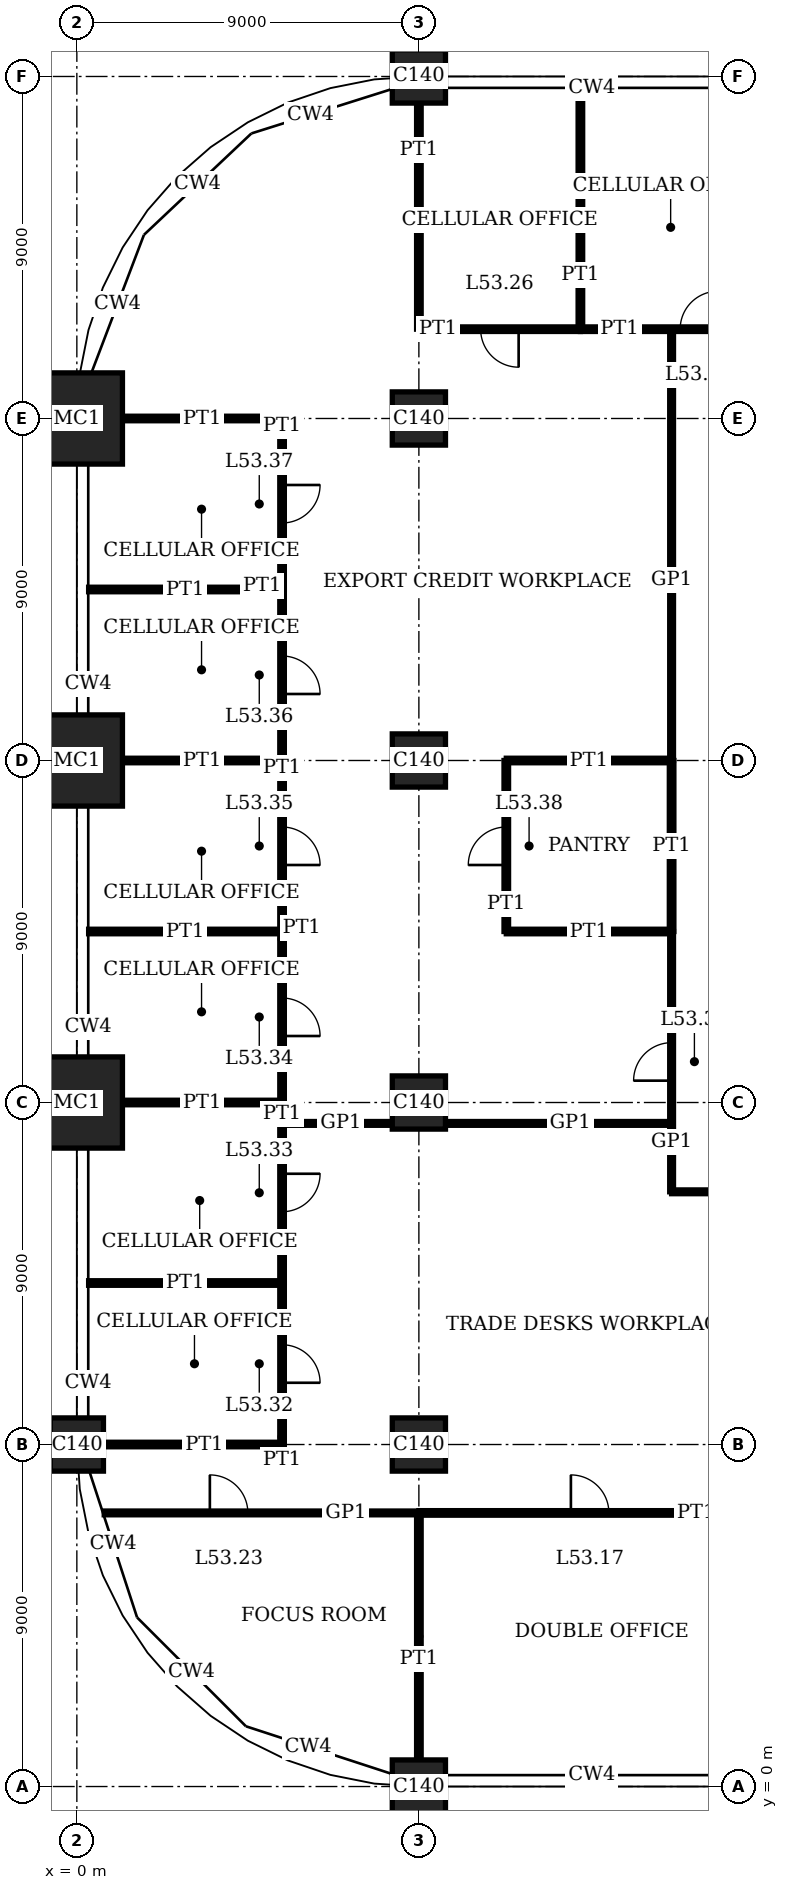
"""IFC4 building model, lengths in metres.
Left out: names, types, materials, properties, quantities, classifications, styles, units other than length and angle.
Written with IfcOpenShell. Run it as: python <this file> out.ifc"""

import sys

from ifc_helpers import new_model, si_unit, direction, frame, frame_2d, origin, origin_2d, place, context, subcontext, project, spatial, rectangle, extrude, element, fill, save


model = new_model("IFC4")
c1 = context("Model", 3, precision=1e-05, world=origin(), true_north=direction((0.0, 1.0)))
c2 = subcontext(c1, "Body", "Model", "MODEL_VIEW")
j1 = project(units=[si_unit("LENGTHUNIT", "METRE"), si_unit("PLANEANGLEUNIT", "RADIAN")], contexts=[c1])
p1 = place(None, origin())
s1 = spatial("IfcSite", under=j1, at=p1, CompositionType="ELEMENT")
p2 = place(p1, origin())
s2 = spatial("IfcBuilding", under=s1, at=p2, CompositionType="ELEMENT")
p3 = place(p2, frame((0.0, 0.0, 218.2)))
s3 = spatial("IfcBuildingStorey", under=s2, at=p3, CompositionType="ELEMENT", Elevation=218.2)
p4 = place(p3, frame((0.0, 9.0, 0.0), z_axis=(0.0, 0.0, 1.0), x_axis=(1.0, 0.0, 0.0)))
e1 = element("IfcColumn", 1, at=p4, inside=s3, PredefinedType="COLUMN", context=c2, shape_type="SweptSolid", body=[
    extrude(rectangle(XDim=1.4, YDim=1.4, at=origin_2d()), origin(), (0.0, 0.0, 1.0), 4.0),
])
for number, where, z_axis, x_axis in (
    (2, (0.0, 18.0, 0.0), (0.0, 0.0, 1.0), (1.0, 0.0, 0.0)),
    (3, (0.0, 27.0, 0.0), (0.0, 0.0, 1.0), (1.0, 0.0, 0.0)),
    (4, (0.0, 36.0, 0.0), (0.0, 0.0, 1.0), (1.0, 0.0, 0.0)),
):
    element("IfcColumn", number, at=place(p3, frame(where, z_axis=z_axis, x_axis=x_axis)), inside=s3, PredefinedType="COLUMN", context=c2, shape_type="SweptSolid", body=[
        extrude(rectangle(XDim=2.4, YDim=2.4, at=origin_2d()), origin(), (0.0, 0.0, 1.0), 4.0),
    ])
for number, where, z_axis, x_axis in (
    (5, (9.0, 0.0, 0.0), (0.0, 0.0, 1.0), (1.0, 0.0, 0.0)),
    (6, (9.0, 9.0, 0.0), (0.0, 0.0, 1.0), (1.0, 0.0, 0.0)),
    (7, (9.0, 18.0, 0.0), (0.0, 0.0, 1.0), (1.0, 0.0, 0.0)),
    (8, (9.0, 27.0, 0.0), (0.0, 0.0, 1.0), (1.0, 0.0, 0.0)),
    (9, (9.0, 36.0, 0.0), (0.0, 0.0, 1.0), (1.0, 0.0, 0.0)),
    (10, (9.0, 45.0, 0.0), (0.0, 0.0, 1.0), (1.0, 0.0, 0.0)),
):
    element("IfcColumn", number, at=place(p3, frame(where, z_axis=z_axis, x_axis=x_axis)), inside=s3, PredefinedType="COLUMN", context=c2, shape_type="SweptSolid", body=[
        extrude(rectangle(XDim=1.4, YDim=1.4, at=origin_2d()), origin(), (0.0, 0.0, 1.0), 4.0),
    ])
p5 = place(p3, frame((9.0, 7.2, 0.0), z_axis=(0.0, 0.0, 1.0), x_axis=(1.0, 0.0, 0.0)))
e11 = element("IfcWall", 11, at=p5, inside=s3, PredefinedType="PARTITIONING", context=c2, shape_type="SweptSolid", body=[
    extrude(rectangle(XDim=9.0, YDim=0.12, at=frame_2d((4.5, 0.0))), origin(), (0.0, 0.0, 1.0), 3.75),
])
p6 = place(p5, frame((4.0, 0.0, 0.0)))
e12 = element("IfcOpeningElement", 12, at=p6, cuts=e11, PredefinedType="OPENING", context=c2, shape_type="SweptSolid", body=[
    extrude(rectangle(XDim=1.0, YDim=2.4, at=frame_2d((0.5, 1.2))), frame((0.0, 0.07, 0.0), z_axis=(0.0, -1.0, 0.0), x_axis=(1.0, 0.0, 0.0)), (0.0, 0.0, 1.0), 0.14),
])
p7 = place(p3, frame((0.72, 7.2, 0.0), z_axis=(0.0, 0.0, 1.0), x_axis=(1.0, 0.0, 0.0)))
e13 = element("IfcWall", 13, at=p7, inside=s3, PredefinedType="PARTITIONING", context=c2, shape_type="SweptSolid", body=[
    extrude(rectangle(XDim=8.28, YDim=0.1, at=frame_2d((4.14, 0.0))), origin(), (0.0, 0.0, 1.0), 3.75),
])
p8 = place(p7, frame((2.78, 0.0, 0.0)))
e14 = element("IfcOpeningElement", 14, at=p8, cuts=e13, PredefinedType="OPENING", context=c2, shape_type="SweptSolid", body=[
    extrude(rectangle(XDim=1.0, YDim=2.4, at=frame_2d((0.5, 1.2))), frame((0.0, 0.06, 0.0), z_axis=(0.0, -1.0, 0.0), x_axis=(1.0, 0.0, 0.0)), (0.0, 0.0, 1.0), 0.12),
])
p9 = place(p3, frame((0.7, 9.0, 0.0), z_axis=(0.0, 0.0, 1.0), x_axis=(1.0, 0.0, 0.0)))
e15 = element("IfcWall", 15, at=p9, inside=s3, PredefinedType="PARTITIONING", context=c2, shape_type="SweptSolid", body=[
    extrude(rectangle(XDim=4.7, YDim=0.12, at=frame_2d((2.35, 0.0))), origin(), (0.0, 0.0, 1.0), 3.05),
])
p10 = place(p3, frame((0.31, 13.25, 0.0), z_axis=(0.0, 0.0, 1.0), x_axis=(1.0, 0.0, 0.0)))
e16 = element("IfcWall", 16, at=p10, inside=s3, PredefinedType="PARTITIONING", context=c2, shape_type="SweptSolid", body=[
    extrude(rectangle(XDim=5.09, YDim=0.12, at=frame_2d((2.545, 0.0))), origin(), (0.0, 0.0, 1.0), 3.1),
])
p11 = place(p3, frame((15.65, 15.65, 0.0), z_axis=(0.0, 0.0, 1.0), x_axis=(1.0, 0.0, 0.0)))
e17 = element("IfcWall", 17, at=p11, inside=s3, PredefinedType="PARTITIONING", context=c2, shape_type="SweptSolid", body=[
    extrude(rectangle(XDim=15.85, YDim=0.1, at=frame_2d((7.925, 0.0))), origin(), (0.0, 0.0, 1.0), 3.75),
])
p12 = place(p11, frame((7.425, 0.0, 0.0)))
e18 = element("IfcOpeningElement", 18, at=p12, cuts=e17, PredefinedType="OPENING", context=c2, shape_type="SweptSolid", body=[
    extrude(rectangle(XDim=1.0, YDim=2.4, at=frame_2d((0.5, 1.2))), frame((0.0, 0.06, 0.0), z_axis=(0.0, -1.0, 0.0), x_axis=(1.0, 0.0, 0.0)), (0.0, 0.0, 1.0), 0.12),
])
p13 = place(p3, frame((5.39, 17.45, 0.0), z_axis=(0.0, 0.0, 1.0), x_axis=(1.0, 0.0, 0.0)))
e19 = element("IfcWall", 19, at=p13, inside=s3, PredefinedType="PARTITIONING", context=c2, shape_type="SweptSolid", body=[
    extrude(rectangle(XDim=2.91, YDim=0.1, at=frame_2d((1.455, 0.0))), origin(), (0.0, 0.0, 1.0), 3.05),
])
p14 = place(p3, frame((9.7, 17.45, 0.0), z_axis=(0.0, 0.0, 1.0), x_axis=(1.0, 0.0, 0.0)))
e20 = element("IfcWall", 20, at=p14, inside=s3, PredefinedType="PARTITIONING", context=c2, shape_type="SweptSolid", body=[
    extrude(rectangle(XDim=5.95, YDim=0.1, at=frame_2d((2.975, 0.0))), origin(), (0.0, 0.0, 1.0), 3.05),
])
p15 = place(p3, frame((1.2, 18.0, 0.0), z_axis=(0.0, 0.0, 1.0), x_axis=(1.0, 0.0, 0.0)))
e21 = element("IfcWall", 21, at=p15, inside=s3, PredefinedType="PARTITIONING", context=c2, shape_type="SweptSolid", body=[
    extrude(rectangle(XDim=4.2, YDim=0.12, at=frame_2d((2.1, 0.0))), origin(), (0.0, 0.0, 1.0), 3.05),
])
p16 = place(p3, frame((0.31, 22.5, 0.0), z_axis=(0.0, 0.0, 1.0), x_axis=(1.0, 0.0, 0.0)))
e22 = element("IfcWall", 22, at=p16, inside=s3, PredefinedType="PARTITIONING", context=c2, shape_type="SweptSolid", body=[
    extrude(rectangle(XDim=5.09, YDim=0.12, at=frame_2d((2.545, 0.0))), origin(), (0.0, 0.0, 1.0), 3.1),
])
p17 = place(p3, frame((11.3, 22.5, 0.0), z_axis=(0.0, 0.0, 1.0), x_axis=(1.0, 0.0, 0.0)))
e23 = element("IfcWall", 23, at=p17, inside=s3, PredefinedType="PARTITIONING", context=c2, shape_type="SweptSolid", body=[
    extrude(rectangle(XDim=4.35, YDim=0.12, at=frame_2d((2.175, 0.0))), origin(), (0.0, 0.0, 1.0), 3.1),
])
p18 = place(p3, frame((1.2, 27.0, 0.0), z_axis=(0.0, 0.0, 1.0), x_axis=(1.0, 0.0, 0.0)))
e24 = element("IfcWall", 24, at=p18, inside=s3, PredefinedType="PARTITIONING", context=c2, shape_type="SweptSolid", body=[
    extrude(rectangle(XDim=4.2, YDim=0.12, at=frame_2d((2.1, 0.0))), origin(), (0.0, 0.0, 1.0), 3.05),
])
p19 = place(p3, frame((11.3, 27.0, 0.0), z_axis=(0.0, 0.0, 1.0), x_axis=(1.0, 0.0, 0.0)))
e25 = element("IfcWall", 25, at=p19, inside=s3, PredefinedType="PARTITIONING", context=c2, shape_type="SweptSolid", body=[
    extrude(rectangle(XDim=4.35, YDim=0.12, at=frame_2d((2.175, 0.0))), origin(), (0.0, 0.0, 1.0), 3.05),
])
p20 = place(p3, frame((0.31, 31.5, 0.0), z_axis=(0.0, 0.0, 1.0), x_axis=(1.0, 0.0, 0.0)))
e26 = element("IfcWall", 26, at=p20, inside=s3, PredefinedType="PARTITIONING", context=c2, shape_type="SweptSolid", body=[
    extrude(rectangle(XDim=5.09, YDim=0.12, at=frame_2d((2.545, 0.0))), origin(), (0.0, 0.0, 1.0), 3.1),
])
p21 = place(p3, frame((1.2, 36.0, 0.0), z_axis=(0.0, 0.0, 1.0), x_axis=(1.0, 0.0, 0.0)))
e27 = element("IfcWall", 27, at=p21, inside=s3, PredefinedType="PARTITIONING", context=c2, shape_type="SweptSolid", body=[
    extrude(rectangle(XDim=4.2, YDim=0.12, at=frame_2d((2.1, 0.0))), origin(), (0.0, 0.0, 1.0), 3.05),
])
p22 = place(p3, frame((9.0, 38.35, 0.0), z_axis=(0.0, 0.0, 1.0), x_axis=(1.0, 0.0, 0.0)))
e28 = element("IfcWall", 28, at=p22, inside=s3, PredefinedType="PARTITIONING", context=c2, shape_type="SweptSolid", body=[
    extrude(rectangle(XDim=4.25, YDim=0.12, at=frame_2d((2.125, 0.0))), origin(), (0.0, 0.0, 1.0), 3.75),
])
p23 = place(p22, frame((1.625, 0.0, 0.0)))
e29 = element("IfcOpeningElement", 29, at=p23, cuts=e28, PredefinedType="OPENING", context=c2, shape_type="SweptSolid", body=[
    extrude(rectangle(XDim=1.0, YDim=2.4, at=frame_2d((0.5, 1.2))), frame((0.0, 0.07, 0.0), z_axis=(0.0, -1.0, 0.0), x_axis=(1.0, 0.0, 0.0)), (0.0, 0.0, 1.0), 0.14),
])
p24 = place(p3, frame((13.25, 38.35, 0.0), z_axis=(0.0, 0.0, 1.0), x_axis=(1.0, 0.0, 0.0)))
e30 = element("IfcWall", 30, at=p24, inside=s3, PredefinedType="PARTITIONING", context=c2, shape_type="SweptSolid", body=[
    extrude(rectangle(XDim=4.75, YDim=0.12, at=frame_2d((2.375, 0.0))), origin(), (0.0, 0.0, 1.0), 3.75),
])
p25 = place(p24, frame((2.625, 0.0, 0.0)))
e31 = element("IfcOpeningElement", 31, at=p25, cuts=e30, PredefinedType="OPENING", context=c2, shape_type="SweptSolid", body=[
    extrude(rectangle(XDim=1.0, YDim=2.4, at=frame_2d((0.5, 1.2))), frame((0.0, 0.07, 0.0), z_axis=(0.0, -1.0, 0.0), x_axis=(1.0, 0.0, 0.0)), (0.0, 0.0, 1.0), 0.14),
])
p26 = place(p3, frame((5.4, 9.0, 0.0), z_axis=(0.0, 0.0, 1.0), x_axis=(0.0, 1.0, 0.0)))
e32 = element("IfcWall", 32, at=p26, inside=s3, PredefinedType="PARTITIONING", context=c2, shape_type="SweptSolid", body=[
    extrude(rectangle(XDim=4.25, YDim=0.12, at=frame_2d((2.125, 0.0))), origin(), (0.0, 0.0, 1.0), 3.75),
])
p27 = place(p26, frame((1.625, 0.0, 0.0)))
e33 = element("IfcOpeningElement", 33, at=p27, cuts=e32, PredefinedType="OPENING", context=c2, shape_type="SweptSolid", body=[
    extrude(rectangle(XDim=1.0, YDim=2.4, at=frame_2d((0.5, 1.2))), frame((0.0, 0.07, 0.0), z_axis=(0.0, -1.0, 0.0), x_axis=(1.0, 0.0, 0.0)), (0.0, 0.0, 1.0), 0.14),
])
p28 = place(p3, frame((5.4, 13.25, 0.0), z_axis=(0.0, 0.0, 1.0), x_axis=(0.0, 1.0, 0.0)))
e34 = element("IfcWall", 34, at=p28, inside=s3, PredefinedType="PARTITIONING", context=c2, shape_type="SweptSolid", body=[
    extrude(rectangle(XDim=4.75, YDim=0.12, at=frame_2d((2.375, 0.0))), origin(), (0.0, 0.0, 1.0), 3.75),
])
p29 = place(p28, frame((1.875, 0.0, 0.0)))
e35 = element("IfcOpeningElement", 35, at=p29, cuts=e34, PredefinedType="OPENING", context=c2, shape_type="SweptSolid", body=[
    extrude(rectangle(XDim=1.0, YDim=2.4, at=frame_2d((0.5, 1.2))), frame((0.0, 0.07, 0.0), z_axis=(0.0, -1.0, 0.0), x_axis=(1.0, 0.0, 0.0)), (0.0, 0.0, 1.0), 0.14),
])
p30 = place(p3, frame((5.4, 18.0, 0.0), z_axis=(0.0, 0.0, 1.0), x_axis=(0.0, 1.0, 0.0)))
e36 = element("IfcWall", 36, at=p30, inside=s3, PredefinedType="PARTITIONING", context=c2, shape_type="SweptSolid", body=[
    extrude(rectangle(XDim=4.5, YDim=0.12, at=frame_2d((2.25, 0.0))), origin(), (0.0, 0.0, 1.0), 3.75),
])
p31 = place(p30, frame((1.75, 0.0, 0.0)))
e37 = element("IfcOpeningElement", 37, at=p31, cuts=e36, PredefinedType="OPENING", context=c2, shape_type="SweptSolid", body=[
    extrude(rectangle(XDim=1.0, YDim=2.4, at=frame_2d((0.5, 1.2))), frame((0.0, 0.07, 0.0), z_axis=(0.0, -1.0, 0.0), x_axis=(1.0, 0.0, 0.0)), (0.0, 0.0, 1.0), 0.14),
])
p32 = place(p3, frame((5.4, 22.5, 0.0), z_axis=(0.0, 0.0, 1.0), x_axis=(0.0, 1.0, 0.0)))
e38 = element("IfcWall", 38, at=p32, inside=s3, PredefinedType="PARTITIONING", context=c2, shape_type="SweptSolid", body=[
    extrude(rectangle(XDim=4.5, YDim=0.12, at=frame_2d((2.25, 0.0))), origin(), (0.0, 0.0, 1.0), 3.75),
])
p33 = place(p32, frame((1.75, 0.0, 0.0)))
e39 = element("IfcOpeningElement", 39, at=p33, cuts=e38, PredefinedType="OPENING", context=c2, shape_type="SweptSolid", body=[
    extrude(rectangle(XDim=1.0, YDim=2.4, at=frame_2d((0.5, 1.2))), frame((0.0, 0.07, 0.0), z_axis=(0.0, -1.0, 0.0), x_axis=(1.0, 0.0, 0.0)), (0.0, 0.0, 1.0), 0.14),
])
p34 = place(p3, frame((5.4, 27.0, 0.0), z_axis=(0.0, 0.0, 1.0), x_axis=(0.0, 1.0, 0.0)))
e40 = element("IfcWall", 40, at=p34, inside=s3, PredefinedType="PARTITIONING", context=c2, shape_type="SweptSolid", body=[
    extrude(rectangle(XDim=4.5, YDim=0.12, at=frame_2d((2.25, 0.0))), origin(), (0.0, 0.0, 1.0), 3.75),
])
p35 = place(p34, frame((1.75, 0.0, 0.0)))
e41 = element("IfcOpeningElement", 41, at=p35, cuts=e40, PredefinedType="OPENING", context=c2, shape_type="SweptSolid", body=[
    extrude(rectangle(XDim=1.0, YDim=2.4, at=frame_2d((0.5, 1.2))), frame((0.0, 0.07, 0.0), z_axis=(0.0, -1.0, 0.0), x_axis=(1.0, 0.0, 0.0)), (0.0, 0.0, 1.0), 0.14),
])
p36 = place(p3, frame((5.4, 31.5, 0.0), z_axis=(0.0, 0.0, 1.0), x_axis=(0.0, 1.0, 0.0)))
e42 = element("IfcWall", 42, at=p36, inside=s3, PredefinedType="PARTITIONING", context=c2, shape_type="SweptSolid", body=[
    extrude(rectangle(XDim=4.5, YDim=0.12, at=frame_2d((2.25, 0.0))), origin(), (0.0, 0.0, 1.0), 3.75),
])
p37 = place(p36, frame((1.75, 0.0, 0.0)))
e43 = element("IfcOpeningElement", 43, at=p37, cuts=e42, PredefinedType="OPENING", context=c2, shape_type="SweptSolid", body=[
    extrude(rectangle(XDim=1.0, YDim=2.4, at=frame_2d((0.5, 1.2))), frame((0.0, 0.07, 0.0), z_axis=(0.0, -1.0, 0.0), x_axis=(1.0, 0.0, 0.0)), (0.0, 0.0, 1.0), 0.14),
])
p38 = place(p3, frame((9.0, 0.7, 0.0), z_axis=(0.0, 0.0, 1.0), x_axis=(0.0, 1.0, 0.0)))
e44 = element("IfcWall", 44, at=p38, inside=s3, PredefinedType="PARTITIONING", context=c2, shape_type="SweptSolid", body=[
    extrude(rectangle(XDim=6.5, YDim=0.12, at=frame_2d((3.25, 0.0))), origin(), (0.0, 0.0, 1.0), 3.05),
])
p39 = place(p3, frame((9.0, 38.35, 0.0), z_axis=(0.0, 0.0, 1.0), x_axis=(0.0, 1.0, 0.0)))
e45 = element("IfcWall", 45, at=p39, inside=s3, PredefinedType="PARTITIONING", context=c2, shape_type="SweptSolid", body=[
    extrude(rectangle(XDim=5.95, YDim=0.12, at=frame_2d((2.975, 0.0))), origin(), (0.0, 0.0, 1.0), 3.05),
])
p40 = place(p3, frame((11.3, 22.5, 0.0), z_axis=(0.0, 0.0, 1.0), x_axis=(0.0, 1.0, 0.0)))
e46 = element("IfcWall", 46, at=p40, inside=s3, PredefinedType="PARTITIONING", context=c2, shape_type="SweptSolid", body=[
    extrude(rectangle(XDim=4.5, YDim=0.12, at=frame_2d((2.25, 0.0))), origin(), (0.0, 0.0, 1.0), 3.75),
])
p41 = place(p40, frame((1.75, 0.0, 0.0)))
e47 = element("IfcOpeningElement", 47, at=p41, cuts=e46, PredefinedType="OPENING", context=c2, shape_type="SweptSolid", body=[
    extrude(rectangle(XDim=1.0, YDim=2.4, at=frame_2d((0.5, 1.2))), frame((0.0, 0.07, 0.0), z_axis=(0.0, -1.0, 0.0), x_axis=(1.0, 0.0, 0.0)), (0.0, 0.0, 1.0), 0.14),
])
p42 = place(p3, frame((13.25, 38.35, 0.0), z_axis=(0.0, 0.0, 1.0), x_axis=(0.0, 1.0, 0.0)))
e48 = element("IfcWall", 48, at=p42, inside=s3, PredefinedType="PARTITIONING", context=c2, shape_type="SweptSolid", body=[
    extrude(rectangle(XDim=6.34, YDim=0.12, at=frame_2d((3.17, 0.0))), origin(), (0.0, 0.0, 1.0), 3.75),
])
p43 = place(p3, frame((15.65, 22.5, 0.0), z_axis=(0.0, 0.0, 1.0), x_axis=(0.0, 1.0, 0.0)))
e49 = element("IfcWall", 49, at=p43, inside=s3, PredefinedType="PARTITIONING", context=c2, shape_type="SweptSolid", body=[
    extrude(rectangle(XDim=4.5, YDim=0.12, at=frame_2d((2.25, 0.0))), origin(), (0.0, 0.0, 1.0), 3.75),
])
p44 = place(p3, frame((15.65, 15.65, 0.0), z_axis=(0.0, 0.0, 1.0), x_axis=(0.0, 1.0, 0.0)))
e50 = element("IfcWall", 50, at=p44, inside=s3, PredefinedType="PARTITIONING", context=c2, shape_type="SweptSolid", body=[
    extrude(rectangle(XDim=6.85, YDim=0.1, at=frame_2d((3.425, 0.0))), origin(), (0.0, 0.0, 1.0), 3.75),
])
p45 = place(p44, frame((2.925, 0.0, 0.0)))
e51 = element("IfcOpeningElement", 51, at=p45, cuts=e50, PredefinedType="OPENING", context=c2, shape_type="SweptSolid", body=[
    extrude(rectangle(XDim=1.0, YDim=2.4, at=frame_2d((0.5, 1.2))), frame((0.0, 0.06, 0.0), z_axis=(0.0, -1.0, 0.0), x_axis=(1.0, 0.0, 0.0)), (0.0, 0.0, 1.0), 0.12),
])
p46 = place(p3, frame((15.65, 27.0, 0.0), z_axis=(0.0, 0.0, 1.0), x_axis=(0.0, 1.0, 0.0)))
e52 = element("IfcWall", 52, at=p46, inside=s3, PredefinedType="PARTITIONING", context=c2, shape_type="SweptSolid", body=[
    extrude(rectangle(XDim=11.35, YDim=0.1, at=frame_2d((5.675, 0.0))), origin(), (0.0, 0.0, 1.0), 3.75),
])
p47 = place(p6, origin())
e53 = element("IfcDoor", 53, at=p47, inside=s3, OperationType="SINGLE_SWING_RIGHT", PredefinedType="DOOR", context=c2, shape_type="SweptSolid", body=[
    extrude(rectangle(XDim=1.0, YDim=2.4, at=frame_2d((0.5, 1.2))), frame((0.0, 0.025, 0.0), z_axis=(0.0, -1.0, 0.0), x_axis=(1.0, 0.0, 0.0)), (0.0, 0.0, 1.0), 0.05),
])
fill(e12, e53)
p48 = place(p8, origin())
e54 = element("IfcDoor", 54, at=p48, inside=s3, OperationType="SINGLE_SWING_RIGHT", PredefinedType="DOOR", context=c2, shape_type="SweptSolid", body=[
    extrude(rectangle(XDim=1.0, YDim=2.4, at=frame_2d((0.5, 1.2))), frame((0.0, 0.02, 0.0), z_axis=(0.0, -1.0, 0.0), x_axis=(1.0, 0.0, 0.0)), (0.0, 0.0, 1.0), 0.04),
])
fill(e14, e54)
p49 = place(p23, origin())
e55 = element("IfcDoor", 55, at=p49, inside=s3, OperationType="SINGLE_SWING_RIGHT", PredefinedType="DOOR", context=c2, shape_type="SweptSolid", body=[
    extrude(rectangle(XDim=1.0, YDim=2.4, at=frame_2d((0.5, 1.2))), frame((0.0, 0.025, 0.0), z_axis=(0.0, -1.0, 0.0), x_axis=(1.0, 0.0, 0.0)), (0.0, 0.0, 1.0), 0.05),
])
fill(e29, e55)
p50 = place(p25, origin())
e56 = element("IfcDoor", 56, at=p50, inside=s3, OperationType="SINGLE_SWING_LEFT", PredefinedType="DOOR", context=c2, shape_type="SweptSolid", body=[
    extrude(rectangle(XDim=1.0, YDim=2.4, at=frame_2d((0.5, 1.2))), frame((0.0, 0.025, 0.0), z_axis=(0.0, -1.0, 0.0), x_axis=(1.0, 0.0, 0.0)), (0.0, 0.0, 1.0), 0.05),
])
fill(e31, e56)
p51 = place(p27, origin())
e57 = element("IfcDoor", 57, at=p51, inside=s3, OperationType="SINGLE_SWING_LEFT", PredefinedType="DOOR", context=c2, shape_type="SweptSolid", body=[
    extrude(rectangle(XDim=1.0, YDim=2.4, at=frame_2d((0.5, 1.2))), frame((0.0, 0.025, 0.0), z_axis=(0.0, -1.0, 0.0), x_axis=(1.0, 0.0, 0.0)), (0.0, 0.0, 1.0), 0.05),
])
fill(e33, e57)
p52 = place(p29, origin())
e58 = element("IfcDoor", 58, at=p52, inside=s3, OperationType="SINGLE_SWING_RIGHT", PredefinedType="DOOR", context=c2, shape_type="SweptSolid", body=[
    extrude(rectangle(XDim=1.0, YDim=2.4, at=frame_2d((0.5, 1.2))), frame((0.0, 0.025, 0.0), z_axis=(0.0, -1.0, 0.0), x_axis=(1.0, 0.0, 0.0)), (0.0, 0.0, 1.0), 0.05),
])
fill(e35, e58)
p53 = place(p31, origin())
e59 = element("IfcDoor", 59, at=p53, inside=s3, OperationType="SINGLE_SWING_LEFT", PredefinedType="DOOR", context=c2, shape_type="SweptSolid", body=[
    extrude(rectangle(XDim=1.0, YDim=2.4, at=frame_2d((0.5, 1.2))), frame((0.0, 0.025, 0.0), z_axis=(0.0, -1.0, 0.0), x_axis=(1.0, 0.0, 0.0)), (0.0, 0.0, 1.0), 0.05),
])
fill(e37, e59)
p54 = place(p33, origin())
e60 = element("IfcDoor", 60, at=p54, inside=s3, OperationType="SINGLE_SWING_LEFT", PredefinedType="DOOR", context=c2, shape_type="SweptSolid", body=[
    extrude(rectangle(XDim=1.0, YDim=2.4, at=frame_2d((0.5, 1.2))), frame((0.0, 0.025, 0.0), z_axis=(0.0, -1.0, 0.0), x_axis=(1.0, 0.0, 0.0)), (0.0, 0.0, 1.0), 0.05),
])
fill(e39, e60)
p55 = place(p35, origin())
e61 = element("IfcDoor", 61, at=p55, inside=s3, OperationType="SINGLE_SWING_LEFT", PredefinedType="DOOR", context=c2, shape_type="SweptSolid", body=[
    extrude(rectangle(XDim=1.0, YDim=2.4, at=frame_2d((0.5, 1.2))), frame((0.0, 0.025, 0.0), z_axis=(0.0, -1.0, 0.0), x_axis=(1.0, 0.0, 0.0)), (0.0, 0.0, 1.0), 0.05),
])
fill(e41, e61)
p56 = place(p37, origin())
e62 = element("IfcDoor", 62, at=p56, inside=s3, OperationType="SINGLE_SWING_RIGHT", PredefinedType="DOOR", context=c2, shape_type="SweptSolid", body=[
    extrude(rectangle(XDim=1.0, YDim=2.4, at=frame_2d((0.5, 1.2))), frame((0.0, 0.025, 0.0), z_axis=(0.0, -1.0, 0.0), x_axis=(1.0, 0.0, 0.0)), (0.0, 0.0, 1.0), 0.05),
])
fill(e43, e62)
p57 = place(p41, origin())
e63 = element("IfcDoor", 63, at=p57, inside=s3, OperationType="SINGLE_SWING_RIGHT", PredefinedType="DOOR", context=c2, shape_type="SweptSolid", body=[
    extrude(rectangle(XDim=1.0, YDim=2.4, at=frame_2d((0.5, 1.2))), frame((0.0, 0.025, 0.0), z_axis=(0.0, -1.0, 0.0), x_axis=(1.0, 0.0, 0.0)), (0.0, 0.0, 1.0), 0.05),
])
fill(e47, e63)
p58 = place(p45, origin())
e64 = element("IfcDoor", 64, at=p58, inside=s3, OperationType="SINGLE_SWING_RIGHT", PredefinedType="DOOR", context=c2, shape_type="SweptSolid", body=[
    extrude(rectangle(XDim=1.0, YDim=2.4, at=frame_2d((0.5, 1.2))), frame((0.0, 0.02, 0.0), z_axis=(0.0, -1.0, 0.0), x_axis=(1.0, 0.0, 0.0)), (0.0, 0.0, 1.0), 0.04),
])
fill(e51, e64)
save(model, sys.argv[1])
